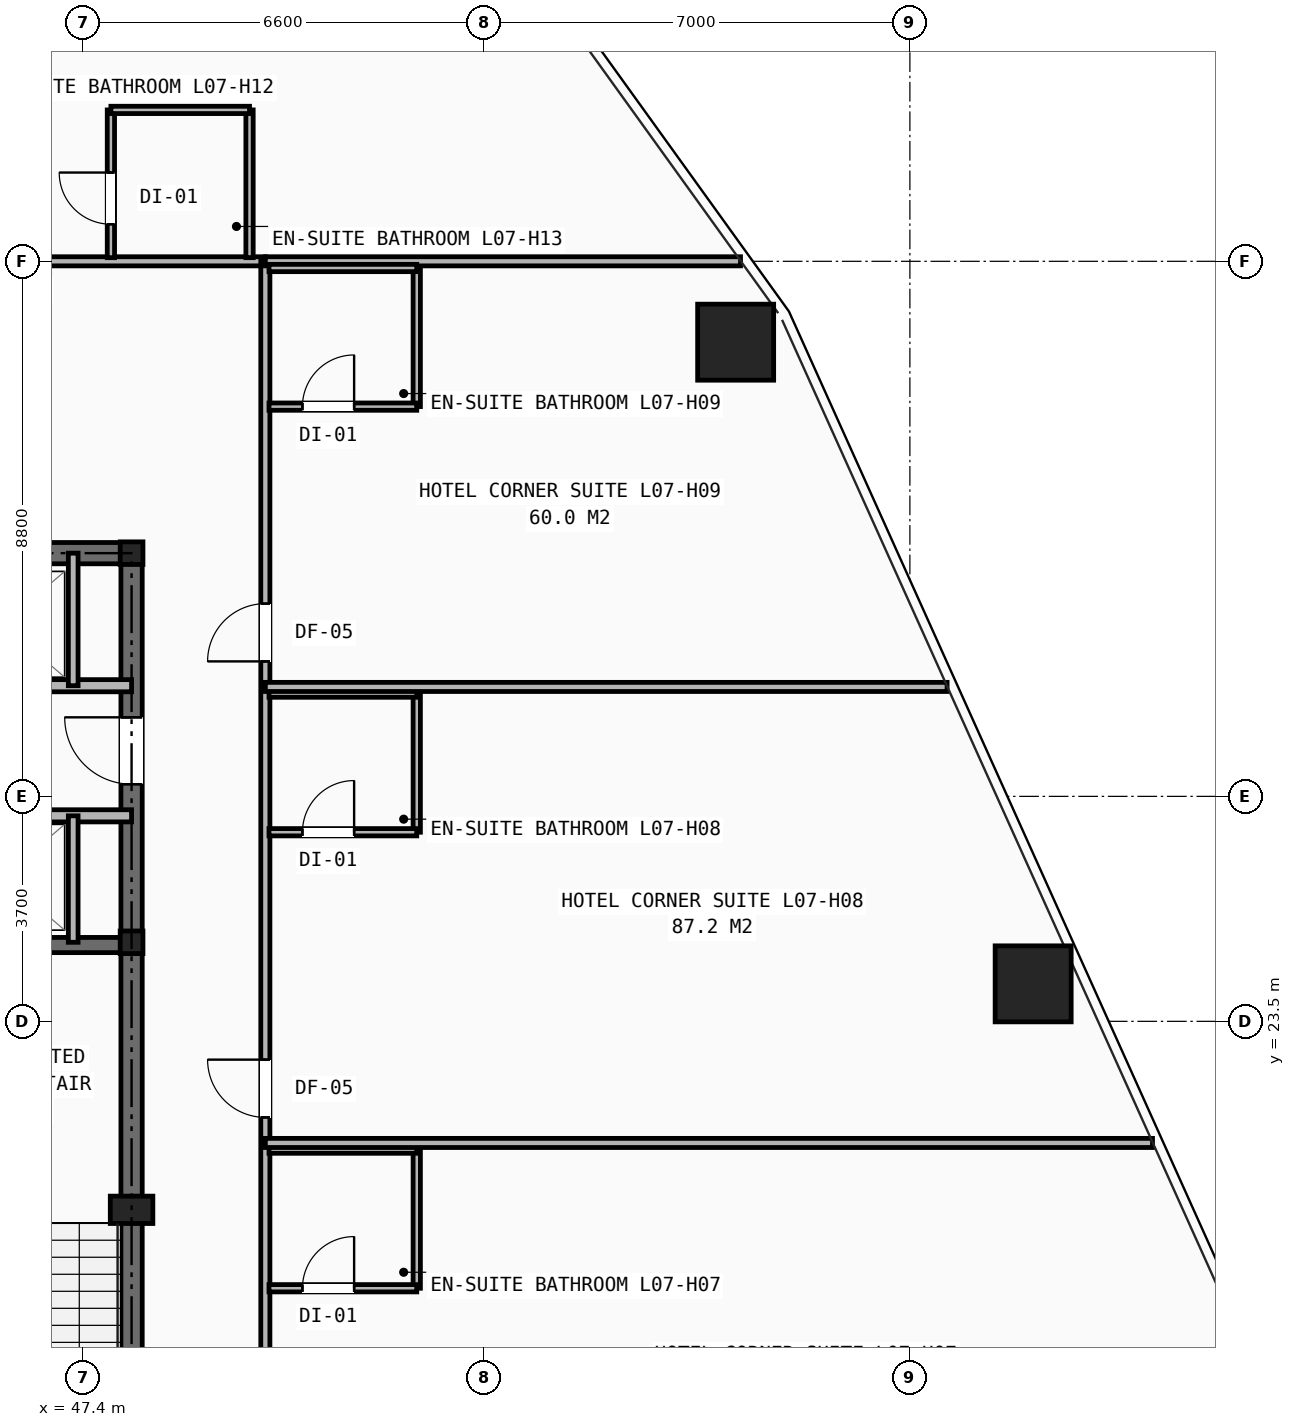
"""IFC4 building model, lengths in metres.
Left out: names, types, materials, properties, quantities, classifications, styles, units other than length and angle.
Written with IfcOpenShell. Run it as: python <this file> out.ifc"""

import sys

from ifc_helpers import new_model, si_unit, direction, frame, frame_2d, origin, origin_2d, place, context, subcontext, project, spatial, rectangle, hollow_rectangle, i_section, extrude, element, fill, save


model = new_model("IFC4")
c1 = context("Model", 3, precision=1e-05, world=origin(), true_north=direction((0.0, 1.0)))
c2 = subcontext(c1, "Body", "Model", "MODEL_VIEW")
j1 = project(units=[si_unit("LENGTHUNIT", "METRE"), si_unit("PLANEANGLEUNIT", "RADIAN")], contexts=[c1])
p1 = place(None, origin())
s1 = spatial("IfcSite", under=j1, at=p1, CompositionType="ELEMENT")
p2 = place(p1, origin())
s2 = spatial("IfcBuilding", under=s1, at=p2, CompositionType="ELEMENT")
p3 = place(p2, frame((0.0, 0.0, 30.4)))
s3 = spatial("IfcBuildingStorey", under=s2, at=p3, CompositionType="ELEMENT", Elevation=30.4)
for number, where, z_axis, x_axis in (
    (1, (48.2, 24.8, 0.0), (0.0, 0.0, 1.0), (1.0, 0.0, 0.0)),
    (2, (48.2, 31.2, 0.0), (0.0, 0.0, 1.0), (1.0, 0.0, 0.0)),
):
    element("IfcColumn", number, at=place(p3, frame(where, z_axis=z_axis, x_axis=x_axis)), inside=s3, PredefinedType="COLUMN", context=c2, shape_type="SweptSolid", body=[
        extrude(i_section(OverallWidth=0.374, OverallDepth=0.372, WebThickness=0.016, FlangeThickness=0.026, at=origin_2d()), origin(), (0.0, 0.0, 1.0), 3.2),
    ])
p4 = place(p3, frame((48.2, 20.4, 0.0), z_axis=(0.0, 0.0, 1.0), x_axis=(1.0, 0.0, 0.0)))
e3 = element("IfcColumn", 3, at=p4, inside=s3, PredefinedType="PILASTER", context=c2, shape_type="SweptSolid", body=[
    extrude(rectangle(XDim=0.7, YDim=0.45, at=origin_2d()), origin(), (0.0, 0.0, 1.0), 3.2),
])
for number, where, z_axis, x_axis in (
    (4, (63.027, 24.116, 0.0), (0.0, 0.0, 1.0), (1.0, 0.0, 0.0)),
    (5, (58.135, 34.67, 0.0), (0.0, 0.0, 1.0), (1.0, 0.0, 0.0)),
):
    element("IfcColumn", number, at=place(p3, frame(where, z_axis=z_axis, x_axis=x_axis)), inside=s3, PredefinedType="COLUMN", context=c2, shape_type="SweptSolid", body=[
        extrude(hollow_rectangle(XDim=1.25, YDim=1.25, WallThickness=0.08, at=origin_2d()), origin(), (0.0, 0.0, 1.0), 3.2),
    ])
p5 = place(p3, frame((31.8, 31.2, 0.0), z_axis=(0.0, 0.0, 1.0), x_axis=(1.0, 0.0, 0.0)))
e6 = element("IfcWall", 6, at=p5, inside=s3, PredefinedType="SHEAR", context=c2, shape_type="SweptSolid", body=[
    extrude(rectangle(XDim=16.4, YDim=0.35, at=frame_2d((8.2, 0.0))), origin(), (0.0, 0.0, 1.0), 2.98),
])
p6 = place(p3, frame((48.2, 16.4, 0.0), z_axis=(0.0, 0.0, 1.0), x_axis=(0.0, 1.0, 0.0)))
e7 = element("IfcWall", 7, at=p6, inside=s3, PredefinedType="SHEAR", context=c2, shape_type="SweptSolid", body=[
    extrude(rectangle(XDim=14.8, YDim=0.35, at=frame_2d((7.4, 0.0))), origin(), (0.0, 0.0, 1.0), 2.98),
])
p7 = place(p6, frame((11.0, 0.0, 0.0)))
e8 = element("IfcOpeningElement", 8, at=p7, cuts=e7, PredefinedType="OPENING", context=c2, shape_type="SweptSolid", body=[
    extrude(rectangle(XDim=1.1, YDim=2.15, at=frame_2d((0.55, 1.075))), frame((0.0, 0.185, 0.0), z_axis=(0.0, -1.0, 0.0), x_axis=(1.0, 0.0, 0.0)), (0.0, 0.0, 1.0), 0.37),
])
p8 = place(p3, frame((44.955, 24.755, 0.0), z_axis=(0.0, 0.0, 1.0), x_axis=(1.0, 0.0, 0.0)))
e9 = element("IfcWall", 9, at=p8, inside=s3, PredefinedType="SHEAR", context=c2, shape_type="SweptSolid", body=[
    extrude(rectangle(XDim=3.245, YDim=0.25, at=frame_2d((1.623, 0.0))), origin(), (0.0, 0.0, 1.0), 2.98),
])
p9 = place(p3, frame((31.8, 29.02, 0.0), z_axis=(0.0, 0.0, 1.0), x_axis=(1.0, 0.0, 0.0)))
e10 = element("IfcWall", 10, at=p9, inside=s3, PredefinedType="SOLIDWALL", context=c2, shape_type="SweptSolid", body=[
    extrude(rectangle(XDim=16.4, YDim=0.2, at=frame_2d((8.2, 0.0))), origin(), (0.0, 0.0, 1.0), 2.431),
])
p10 = place(p9, frame((0.55, 0.0, 0.0)))
e11 = element("IfcOpeningElement", 11, at=p10, cuts=e10, PredefinedType="OPENING", context=c2, shape_type="SweptSolid", body=[
    extrude(rectangle(XDim=0.85, YDim=2.05, at=frame_2d((0.425, 1.025))), frame((0.0, 0.11, 0.0), z_axis=(0.0, -1.0, 0.0), x_axis=(1.0, 0.0, 0.0)), (0.0, 0.0, 1.0), 0.22),
])
p11 = place(p9, frame((2.55, 0.0, 0.0)))
e12 = element("IfcOpeningElement", 12, at=p11, cuts=e10, PredefinedType="OPENING", context=c2, shape_type="SweptSolid", body=[
    extrude(rectangle(XDim=1.1, YDim=2.15, at=frame_2d((0.55, 1.075))), frame((0.0, 0.11, 0.0), z_axis=(0.0, -1.0, 0.0), x_axis=(1.0, 0.0, 0.0)), (0.0, 0.0, 1.0), 0.22),
])
p12 = place(p9, frame((4.71, 0.0, 0.0)))
e13 = element("IfcOpeningElement", 13, at=p12, cuts=e10, PredefinedType="OPENING", context=c2, shape_type="SweptSolid", body=[
    extrude(rectangle(XDim=1.1, YDim=2.15, at=frame_2d((0.55, 1.075))), frame((0.0, 0.11, 0.0), z_axis=(0.0, -1.0, 0.0), x_axis=(1.0, 0.0, 0.0)), (0.0, 0.0, 1.0), 0.22),
])
p13 = place(p9, frame((6.87, 0.0, 0.0)))
e14 = element("IfcOpeningElement", 14, at=p13, cuts=e10, PredefinedType="OPENING", context=c2, shape_type="SweptSolid", body=[
    extrude(rectangle(XDim=1.1, YDim=2.15, at=frame_2d((0.55, 1.075))), frame((0.0, 0.11, 0.0), z_axis=(0.0, -1.0, 0.0), x_axis=(1.0, 0.0, 0.0)), (0.0, 0.0, 1.0), 0.22),
])
p14 = place(p9, frame((9.03, 0.0, 0.0)))
e15 = element("IfcOpeningElement", 15, at=p14, cuts=e10, PredefinedType="OPENING", context=c2, shape_type="SweptSolid", body=[
    extrude(rectangle(XDim=1.1, YDim=2.15, at=frame_2d((0.55, 1.075))), frame((0.0, 0.11, 0.0), z_axis=(0.0, -1.0, 0.0), x_axis=(1.0, 0.0, 0.0)), (0.0, 0.0, 1.0), 0.22),
])
p15 = place(p3, frame((33.82, 26.88, 0.0), z_axis=(0.0, 0.0, 1.0), x_axis=(1.0, 0.0, 0.0)))
e16 = element("IfcWall", 16, at=p15, inside=s3, PredefinedType="SOLIDWALL", context=c2, shape_type="SweptSolid", body=[
    extrude(rectangle(XDim=14.38, YDim=0.2, at=frame_2d((7.19, 0.0))), origin(), (0.0, 0.0, 1.0), 2.431),
])
p16 = place(p3, frame((47.24, 29.02, 0.0), z_axis=(0.0, 0.0, 1.0), x_axis=(0.0, 1.0, 0.0)))
e17 = element("IfcWall", 17, at=p16, inside=s3, PredefinedType="SOLIDWALL", context=c2, shape_type="SweptSolid", body=[
    extrude(rectangle(XDim=2.18, YDim=0.16, at=frame_2d((1.09, 0.0))), origin(), (0.0, 0.0, 1.0), 2.431),
])
p17 = place(p3, frame((47.24, 24.8, 0.0), z_axis=(0.0, 0.0, 1.0), x_axis=(0.0, 1.0, 0.0)))
e18 = element("IfcWall", 18, at=p17, inside=s3, PredefinedType="SOLIDWALL", context=c2, shape_type="SweptSolid", body=[
    extrude(rectangle(XDim=2.08, YDim=0.16, at=frame_2d((1.04, 0.0))), origin(), (0.0, 0.0, 1.0), 2.98),
])
p18 = place(p3, frame((41.475, 36.0, 0.0), z_axis=(0.0, 0.0, 1.0), x_axis=(1.0, 0.0, 0.0)))
e19 = element("IfcWall", 19, at=p18, inside=s3, PredefinedType="PARTITIONING", context=c2, shape_type="SweptSolid", body=[
    extrude(rectangle(XDim=8.925, YDim=0.15, at=frame_2d((4.462, 0.0))), origin(), (0.0, 0.0, 1.0), 2.513),
])
p19 = place(p18, frame((0.2, 0.0, 0.0)))
e20 = element("IfcOpeningElement", 20, at=p19, cuts=e19, PredefinedType="OPENING", context=c2, shape_type="SweptSolid", body=[
    extrude(rectangle(XDim=0.95, YDim=2.1, at=frame_2d((0.475, 1.05))), frame((0.0, 0.085, 0.0), z_axis=(0.0, -1.0, 0.0), x_axis=(1.0, 0.0, 0.0)), (0.0, 0.0, 1.0), 0.17),
])
p20 = place(p18, frame((4.445, 0.0, 0.0)))
e21 = element("IfcOpeningElement", 21, at=p20, cuts=e19, PredefinedType="OPENING", context=c2, shape_type="SweptSolid", body=[
    extrude(rectangle(XDim=0.95, YDim=2.1, at=frame_2d((0.475, 1.05))), frame((0.0, 0.085, 0.0), z_axis=(0.0, -1.0, 0.0), x_axis=(1.0, 0.0, 0.0)), (0.0, 0.0, 1.0), 0.17),
])
p21 = place(p3, frame((50.4, 14.1, 0.0), z_axis=(0.0, 0.0, 1.0), x_axis=(0.0, 1.0, 0.0)))
e22 = element("IfcWall", 22, at=p21, inside=s3, PredefinedType="PARTITIONING", context=c2, shape_type="SweptSolid", body=[
    extrude(rectangle(XDim=21.9, YDim=0.15, at=frame_2d((10.95, 0.0))), origin(), (0.0, 0.0, 1.0), 2.431),
])
p22 = place(p21, frame((0.42, 0.0, 0.0)))
e23 = element("IfcOpeningElement", 23, at=p22, cuts=e22, PredefinedType="OPENING", context=c2, shape_type="SweptSolid", body=[
    extrude(rectangle(XDim=0.95, YDim=2.1, at=frame_2d((0.475, 1.05))), frame((0.0, 0.085, 0.0), z_axis=(0.0, -1.0, 0.0), x_axis=(1.0, 0.0, 0.0)), (0.0, 0.0, 1.0), 0.17),
])
p23 = place(p21, frame((7.82, 0.0, 0.0)))
e24 = element("IfcOpeningElement", 24, at=p23, cuts=e22, PredefinedType="OPENING", context=c2, shape_type="SweptSolid", body=[
    extrude(rectangle(XDim=0.95, YDim=2.1, at=frame_2d((0.475, 1.05))), frame((0.0, 0.085, 0.0), z_axis=(0.0, -1.0, 0.0), x_axis=(1.0, 0.0, 0.0)), (0.0, 0.0, 1.0), 0.17),
])
p24 = place(p21, frame((15.32, 0.0, 0.0)))
e25 = element("IfcOpeningElement", 25, at=p24, cuts=e22, PredefinedType="OPENING", context=c2, shape_type="SweptSolid", body=[
    extrude(rectangle(XDim=0.95, YDim=2.1, at=frame_2d((0.475, 1.05))), frame((0.0, 0.085, 0.0), z_axis=(0.0, -1.0, 0.0), x_axis=(1.0, 0.0, 0.0)), (0.0, 0.0, 1.0), 0.17),
])
p25 = place(p3, frame((50.4, 36.0, 0.0), z_axis=(0.0, 0.0, 1.0), x_axis=(1.0, 0.0, 0.0)))
e26 = element("IfcWall", 26, at=p25, inside=s3, PredefinedType="PARTITIONING", context=c2, shape_type="SweptSolid", body=[
    extrude(rectangle(XDim=7.814, YDim=0.15, at=frame_2d((3.907, 0.0))), origin(), (0.0, 0.0, 1.0), 2.268),
])
p26 = place(p3, frame((52.89, 19.11, 0.0), z_axis=(0.0, 0.0, 1.0), x_axis=(0.0, 1.0, 0.0)))
e27 = element("IfcWall", 27, at=p26, inside=s3, PredefinedType="PARTITIONING", context=c2, shape_type="SweptSolid", body=[
    extrude(rectangle(XDim=2.28, YDim=0.12, at=frame_2d((1.14, 0.0))), origin(), (0.0, 0.0, 1.0), 2.98),
])
p27 = place(p3, frame((50.46, 19.11, 0.0), z_axis=(0.0, 0.0, 1.0), x_axis=(1.0, 0.0, 0.0)))
e28 = element("IfcWall", 28, at=p27, inside=s3, PredefinedType="PARTITIONING", context=c2, shape_type="SweptSolid", body=[
    extrude(rectangle(XDim=2.43, YDim=0.12, at=frame_2d((1.215, 0.0))), origin(), (0.0, 0.0, 1.0), 2.98),
])
p28 = place(p27, frame((0.55, 0.0, 0.0)))
e29 = element("IfcOpeningElement", 29, at=p28, cuts=e28, PredefinedType="OPENING", context=c2, shape_type="SweptSolid", body=[
    extrude(rectangle(XDim=0.85, YDim=2.05, at=frame_2d((0.425, 1.025))), frame((0.0, 0.07, 0.0), z_axis=(0.0, -1.0, 0.0), x_axis=(1.0, 0.0, 0.0)), (0.0, 0.0, 1.0), 0.14),
])
p29 = place(p3, frame((50.46, 21.39, 0.0), z_axis=(0.0, 0.0, 1.0), x_axis=(1.0, 0.0, 0.0)))
e30 = element("IfcWall", 30, at=p29, inside=s3, PredefinedType="PARTITIONING", context=c2, shape_type="SweptSolid", body=[
    extrude(rectangle(XDim=2.43, YDim=0.12, at=frame_2d((1.215, 0.0))), origin(), (0.0, 0.0, 1.0), 2.98),
])
p30 = place(p3, frame((50.4, 21.5, 0.0), z_axis=(0.0, 0.0, 1.0), x_axis=(1.0, 0.0, 0.0)))
e31 = element("IfcWall", 31, at=p30, inside=s3, PredefinedType="PARTITIONING", context=c2, shape_type="SweptSolid", body=[
    extrude(rectangle(XDim=14.59, YDim=0.15, at=frame_2d((7.295, 0.0))), origin(), (0.0, 0.0, 1.0), 2.268),
])
p31 = place(p3, frame((52.89, 26.61, 0.0), z_axis=(0.0, 0.0, 1.0), x_axis=(0.0, 1.0, 0.0)))
e32 = element("IfcWall", 32, at=p31, inside=s3, PredefinedType="PARTITIONING", context=c2, shape_type="SweptSolid", body=[
    extrude(rectangle(XDim=2.28, YDim=0.12, at=frame_2d((1.14, 0.0))), origin(), (0.0, 0.0, 1.0), 2.98),
])
p32 = place(p3, frame((50.46, 26.61, 0.0), z_axis=(0.0, 0.0, 1.0), x_axis=(1.0, 0.0, 0.0)))
e33 = element("IfcWall", 33, at=p32, inside=s3, PredefinedType="PARTITIONING", context=c2, shape_type="SweptSolid", body=[
    extrude(rectangle(XDim=2.43, YDim=0.12, at=frame_2d((1.215, 0.0))), origin(), (0.0, 0.0, 1.0), 2.98),
])
p33 = place(p32, frame((0.55, 0.0, 0.0)))
e34 = element("IfcOpeningElement", 34, at=p33, cuts=e33, PredefinedType="OPENING", context=c2, shape_type="SweptSolid", body=[
    extrude(rectangle(XDim=0.85, YDim=2.05, at=frame_2d((0.425, 1.025))), frame((0.0, 0.07, 0.0), z_axis=(0.0, -1.0, 0.0), x_axis=(1.0, 0.0, 0.0)), (0.0, 0.0, 1.0), 0.14),
])
p34 = place(p3, frame((50.46, 28.89, 0.0), z_axis=(0.0, 0.0, 1.0), x_axis=(1.0, 0.0, 0.0)))
e35 = element("IfcWall", 35, at=p34, inside=s3, PredefinedType="PARTITIONING", context=c2, shape_type="SweptSolid", body=[
    extrude(rectangle(XDim=2.43, YDim=0.12, at=frame_2d((1.215, 0.0))), origin(), (0.0, 0.0, 1.0), 2.98),
])
p35 = place(p3, frame((50.4, 29.0, 0.0), z_axis=(0.0, 0.0, 1.0), x_axis=(1.0, 0.0, 0.0)))
e36 = element("IfcWall", 36, at=p35, inside=s3, PredefinedType="PARTITIONING", context=c2, shape_type="SweptSolid", body=[
    extrude(rectangle(XDim=11.212, YDim=0.15, at=frame_2d((5.606, 0.0))), origin(), (0.0, 0.0, 1.0), 2.268),
])
p36 = place(p3, frame((52.89, 33.61, 0.0), z_axis=(0.0, 0.0, 1.0), x_axis=(0.0, 1.0, 0.0)))
e37 = element("IfcWall", 37, at=p36, inside=s3, PredefinedType="PARTITIONING", context=c2, shape_type="SweptSolid", body=[
    extrude(rectangle(XDim=2.28, YDim=0.12, at=frame_2d((1.14, 0.0))), origin(), (0.0, 0.0, 1.0), 2.98),
])
p37 = place(p3, frame((50.46, 33.61, 0.0), z_axis=(0.0, 0.0, 1.0), x_axis=(1.0, 0.0, 0.0)))
e38 = element("IfcWall", 38, at=p37, inside=s3, PredefinedType="PARTITIONING", context=c2, shape_type="SweptSolid", body=[
    extrude(rectangle(XDim=2.43, YDim=0.12, at=frame_2d((1.215, 0.0))), origin(), (0.0, 0.0, 1.0), 2.513),
])
p38 = place(p37, frame((0.55, 0.0, 0.0)))
e39 = element("IfcOpeningElement", 39, at=p38, cuts=e38, PredefinedType="OPENING", context=c2, shape_type="SweptSolid", body=[
    extrude(rectangle(XDim=0.85, YDim=2.05, at=frame_2d((0.425, 1.025))), frame((0.0, 0.07, 0.0), z_axis=(0.0, -1.0, 0.0), x_axis=(1.0, 0.0, 0.0)), (0.0, 0.0, 1.0), 0.14),
])
p39 = place(p3, frame((50.46, 35.89, 0.0), z_axis=(0.0, 0.0, 1.0), x_axis=(1.0, 0.0, 0.0)))
e40 = element("IfcWall", 40, at=p39, inside=s3, PredefinedType="PARTITIONING", context=c2, shape_type="SweptSolid", body=[
    extrude(rectangle(XDim=2.43, YDim=0.12, at=frame_2d((1.215, 0.0))), origin(), (0.0, 0.0, 1.0), 2.513),
])
p40 = place(p3, frame((47.86, 36.06, 0.0), z_axis=(0.0, 0.0, 1.0), x_axis=(0.0, 1.0, 0.0)))
e41 = element("IfcWall", 41, at=p40, inside=s3, PredefinedType="PARTITIONING", context=c2, shape_type="SweptSolid", body=[
    extrude(rectangle(XDim=2.43, YDim=0.12, at=frame_2d((1.215, 0.0))), origin(), (0.0, 0.0, 1.0), 2.98),
])
p41 = place(p40, frame((0.55, 0.0, 0.0)))
e42 = element("IfcOpeningElement", 42, at=p41, cuts=e41, PredefinedType="OPENING", context=c2, shape_type="SweptSolid", body=[
    extrude(rectangle(XDim=0.85, YDim=2.05, at=frame_2d((0.425, 1.025))), frame((0.0, 0.07, 0.0), z_axis=(0.0, -1.0, 0.0), x_axis=(1.0, 0.0, 0.0)), (0.0, 0.0, 1.0), 0.14),
])
p42 = place(p3, frame((50.14, 36.06, 0.0), z_axis=(0.0, 0.0, 1.0), x_axis=(0.0, 1.0, 0.0)))
e43 = element("IfcWall", 43, at=p42, inside=s3, PredefinedType="PARTITIONING", context=c2, shape_type="SweptSolid", body=[
    extrude(rectangle(XDim=2.43, YDim=0.12, at=frame_2d((1.215, 0.0))), origin(), (0.0, 0.0, 1.0), 2.513),
])
p43 = place(p3, frame((47.86, 38.49, 0.0), z_axis=(0.0, 0.0, 1.0), x_axis=(1.0, 0.0, 0.0)))
e44 = element("IfcWall", 44, at=p43, inside=s3, PredefinedType="PARTITIONING", context=c2, shape_type="SweptSolid", body=[
    extrude(rectangle(XDim=2.28, YDim=0.12, at=frame_2d((1.14, 0.0))), origin(), (0.0, 0.0, 1.0), 2.513),
])
p44 = place(p7, origin())
e45 = element("IfcDoor", 45, at=p44, inside=s3, OperationType="SINGLE_SWING_RIGHT", PredefinedType="DOOR", context=c2, shape_type="SweptSolid", body=[
    extrude(rectangle(XDim=1.1, YDim=2.15, at=frame_2d((0.55, 1.075))), frame((0.0, 0.025, 0.0), z_axis=(0.0, -1.0, 0.0), x_axis=(1.0, 0.0, 0.0)), (0.0, 0.0, 1.0), 0.05),
])
fill(e8, e45)
p45 = place(p28, origin())
e46 = element("IfcDoor", 46, at=p45, inside=s3, OperationType="SINGLE_SWING_RIGHT", PredefinedType="DOOR", context=c2, shape_type="SweptSolid", body=[
    extrude(rectangle(XDim=0.85, YDim=2.05, at=frame_2d((0.425, 1.025))), frame((0.0, 0.025, 0.0), z_axis=(0.0, -1.0, 0.0), x_axis=(1.0, 0.0, 0.0)), (0.0, 0.0, 1.0), 0.05),
])
fill(e29, e46)
p46 = place(p23, origin())
e47 = element("IfcDoor", 47, at=p46, inside=s3, OperationType="SINGLE_SWING_RIGHT", PredefinedType="DOOR", context=c2, shape_type="SweptSolid", body=[
    extrude(rectangle(XDim=0.95, YDim=2.1, at=frame_2d((0.475, 1.05))), frame((0.0, 0.025, 0.0), z_axis=(0.0, -1.0, 0.0), x_axis=(1.0, 0.0, 0.0)), (0.0, 0.0, 1.0), 0.05),
])
fill(e24, e47)
p47 = place(p33, origin())
e48 = element("IfcDoor", 48, at=p47, inside=s3, OperationType="SINGLE_SWING_RIGHT", PredefinedType="DOOR", context=c2, shape_type="SweptSolid", body=[
    extrude(rectangle(XDim=0.85, YDim=2.05, at=frame_2d((0.425, 1.025))), frame((0.0, 0.025, 0.0), z_axis=(0.0, -1.0, 0.0), x_axis=(1.0, 0.0, 0.0)), (0.0, 0.0, 1.0), 0.05),
])
fill(e34, e48)
p48 = place(p24, origin())
e49 = element("IfcDoor", 49, at=p48, inside=s3, OperationType="SINGLE_SWING_LEFT", PredefinedType="DOOR", context=c2, shape_type="SweptSolid", body=[
    extrude(rectangle(XDim=0.95, YDim=2.1, at=frame_2d((0.475, 1.05))), frame((0.0, 0.025, 0.0), z_axis=(0.0, -1.0, 0.0), x_axis=(1.0, 0.0, 0.0)), (0.0, 0.0, 1.0), 0.05),
])
fill(e25, e49)
p49 = place(p38, origin())
e50 = element("IfcDoor", 50, at=p49, inside=s3, OperationType="SINGLE_SWING_RIGHT", PredefinedType="DOOR", context=c2, shape_type="SweptSolid", body=[
    extrude(rectangle(XDim=0.85, YDim=2.05, at=frame_2d((0.425, 1.025))), frame((0.0, 0.025, 0.0), z_axis=(0.0, -1.0, 0.0), x_axis=(1.0, 0.0, 0.0)), (0.0, 0.0, 1.0), 0.05),
])
fill(e39, e50)
p50 = place(p41, origin())
e51 = element("IfcDoor", 51, at=p50, inside=s3, OperationType="SINGLE_SWING_RIGHT", PredefinedType="DOOR", context=c2, shape_type="SweptSolid", body=[
    extrude(rectangle(XDim=0.85, YDim=2.05, at=frame_2d((0.425, 1.025))), frame((0.0, 0.025, 0.0), z_axis=(0.0, -1.0, 0.0), x_axis=(1.0, 0.0, 0.0)), (0.0, 0.0, 1.0), 0.05),
])
fill(e42, e51)
save(model, sys.argv[1])
